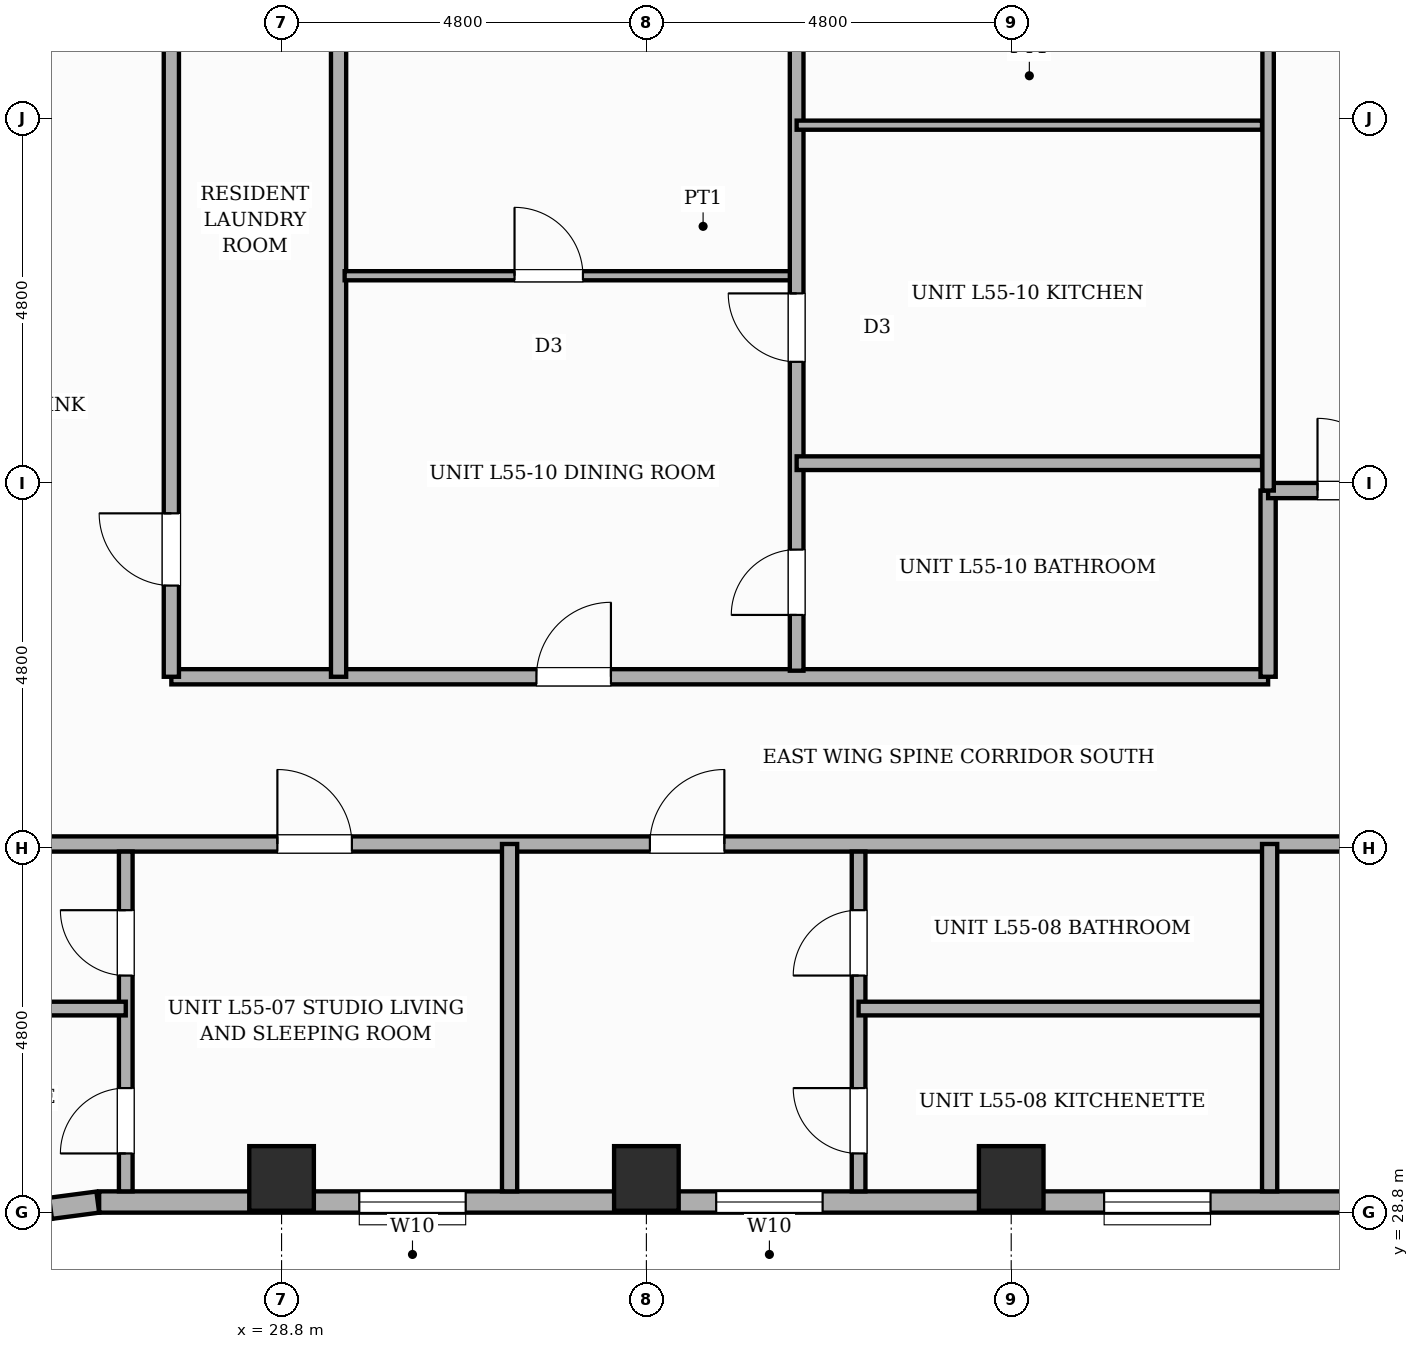
"""IFC4 building model, lengths in metres.
Left out: names, types, materials, properties, quantities, classifications, styles, units other than length and angle.
Written with IfcOpenShell. Run it as: python <this file> out.ifc"""

import sys

from ifc_helpers import new_model, si_unit, direction, frame, frame_2d, origin, origin_2d, place, context, subcontext, project, spatial, rectangle, extrude, element, fill, save


model = new_model("IFC4")
c1 = context("Model", 3, precision=1e-05, world=origin(), true_north=direction((0.0, 1.0)))
c2 = subcontext(c1, "Body", "Model", "MODEL_VIEW")
j1 = project(units=[si_unit("LENGTHUNIT", "METRE"), si_unit("PLANEANGLEUNIT", "RADIAN")], contexts=[c1])
p1 = place(None, origin())
s1 = spatial("IfcSite", under=j1, at=p1, CompositionType="ELEMENT")
p2 = place(p1, origin())
s2 = spatial("IfcBuilding", under=s1, at=p2, CompositionType="ELEMENT")
p3 = place(p2, frame((0.0, 0.0, 211.0)))
s3 = spatial("IfcBuildingStorey", under=s2, at=p3, CompositionType="ELEMENT", Elevation=211.0)
for number, where, z_axis, x_axis in (
    (1, (28.8, 29.25, 0.0), (0.0, 0.0, 1.0), (1.0, 0.0, 0.0)),
    (2, (33.6, 29.25, 0.0), (0.0, 0.0, 1.0), (1.0, 0.0, 0.0)),
    (3, (38.4, 29.25, 0.0), (0.0, 0.0, 1.0), (1.0, 0.0, 0.0)),
):
    element("IfcColumn", number, at=place(p3, frame(where, z_axis=z_axis, x_axis=x_axis)), inside=s3, PredefinedType="COLUMN", context=c2, shape_type="SweptSolid", body=[
        extrude(rectangle(XDim=0.85, YDim=0.85, at=origin_2d()), origin(), (0.0, 0.0, 1.0), 3.6),
    ])
p4 = place(p3, frame((50.4, 28.94, 0.0), z_axis=(0.0, 0.0, 1.0), x_axis=(-1.0, 0.0, 0.0)))
e4 = element("IfcWall", 4, at=p4, inside=s3, PredefinedType="STANDARD", context=c2, shape_type="SweptSolid", body=[
    extrude(rectangle(XDim=24.0, YDim=0.28, at=frame_2d((12.0, 0.0))), origin(), (0.0, 0.0, 1.0), 2.66),
])
p5 = place(p4, frame((19.177, 0.0, 0.65)))
e5 = element("IfcOpeningElement", 5, at=p5, cuts=e4, PredefinedType="OPENING", context=c2, shape_type="SweptSolid", body=[
    extrude(rectangle(XDim=1.4, YDim=1.1, at=frame_2d((0.7, 0.55))), frame((0.0, 0.15, 0.0), z_axis=(0.0, -1.0, 0.0), x_axis=(1.0, 0.0, 0.0)), (0.0, 0.0, 1.0), 0.3),
])
p6 = place(p4, frame((14.481, 0.0, 0.65)))
e6 = element("IfcOpeningElement", 6, at=p6, cuts=e4, PredefinedType="OPENING", context=c2, shape_type="SweptSolid", body=[
    extrude(rectangle(XDim=1.4, YDim=1.1, at=frame_2d((0.7, 0.55))), frame((0.0, 0.15, 0.0), z_axis=(0.0, -1.0, 0.0), x_axis=(1.0, 0.0, 0.0)), (0.0, 0.0, 1.0), 0.3),
])
p7 = place(p4, frame((4.847, 0.0, 0.65)))
e7 = element("IfcOpeningElement", 7, at=p7, cuts=e4, PredefinedType="OPENING", context=c2, shape_type="SweptSolid", body=[
    extrude(rectangle(XDim=1.4, YDim=1.1, at=frame_2d((0.7, 0.55))), frame((0.0, 0.15, 0.0), z_axis=(0.0, -1.0, 0.0), x_axis=(1.0, 0.0, 0.0)), (0.0, 0.0, 1.0), 0.3),
])
p8 = place(p4, frame((9.377, 0.0, 0.65)))
e8 = element("IfcOpeningElement", 8, at=p8, cuts=e4, PredefinedType="OPENING", context=c2, shape_type="SweptSolid", body=[
    extrude(rectangle(XDim=1.4, YDim=1.1, at=frame_2d((0.7, 0.55))), frame((0.0, 0.15, 0.0), z_axis=(0.0, -1.0, 0.0), x_axis=(1.0, 0.0, 0.0)), (0.0, 0.0, 1.0), 0.3),
])
p9 = place(p4, frame((0.308, 0.0, 0.65)))
e9 = element("IfcOpeningElement", 9, at=p9, cuts=e4, PredefinedType="OPENING", context=c2, shape_type="SweptSolid", body=[
    extrude(rectangle(XDim=1.4, YDim=1.1, at=frame_2d((0.7, 0.55))), frame((0.0, 0.15, 0.0), z_axis=(0.0, -1.0, 0.0), x_axis=(1.0, 0.0, 0.0)), (0.0, 0.0, 1.0), 0.3),
])
p10 = place(p3, frame((26.382, 28.939, 0.0), z_axis=(0.0, 0.0, 1.0), x_axis=(-0.9914410257, -0.130555323746, 0.0)))
e10 = element("IfcWall", 10, at=p10, inside=s3, PredefinedType="STANDARD", context=c2, shape_type="SweptSolid", body=[
    extrude(rectangle(XDim=0.626, YDim=0.28, at=frame_2d((0.313, 0.0))), origin(), (0.0, 0.0, 1.0), 3.38),
])
p11 = place(p3, frame((22.75, 33.65, 0.0), z_axis=(0.0, 0.0, 1.0), x_axis=(1.0, 0.0, 0.0)))
e11 = element("IfcWall", 11, at=p11, inside=s3, PredefinedType="PARTITIONING", context=c2, shape_type="SweptSolid", body=[
    extrude(rectangle(XDim=29.77, YDim=0.2, at=frame_2d((14.885, 0.0))), origin(), (0.0, 0.0, 1.0), 3.38),
])
p12 = place(p11, frame((5.995, 0.0, 0.0)))
e12 = element("IfcOpeningElement", 12, at=p12, cuts=e11, PredefinedType="OPENING", context=c2, shape_type="SweptSolid", body=[
    extrude(rectangle(XDim=0.98, YDim=2.18, at=frame_2d((0.49, 1.09))), frame((0.0, 0.11, 0.0), z_axis=(0.0, -1.0, 0.0), x_axis=(1.0, 0.0, 0.0)), (0.0, 0.0, 1.0), 0.22),
])
p13 = place(p11, frame((10.896, 0.0, 0.0)))
e13 = element("IfcOpeningElement", 13, at=p13, cuts=e11, PredefinedType="OPENING", context=c2, shape_type="SweptSolid", body=[
    extrude(rectangle(XDim=0.98, YDim=2.18, at=frame_2d((0.49, 1.09))), frame((0.0, 0.11, 0.0), z_axis=(0.0, -1.0, 0.0), x_axis=(1.0, 0.0, 0.0)), (0.0, 0.0, 1.0), 0.22),
])
p14 = place(p11, frame((20.73, 0.0, 0.0)))
e14 = element("IfcOpeningElement", 14, at=p14, cuts=e11, PredefinedType="OPENING", context=c2, shape_type="SweptSolid", body=[
    extrude(rectangle(XDim=0.98, YDim=2.18, at=frame_2d((0.49, 1.09))), frame((0.0, 0.11, 0.0), z_axis=(0.0, -1.0, 0.0), x_axis=(1.0, 0.0, 0.0)), (0.0, 0.0, 1.0), 0.22),
])
p15 = place(p3, frame((27.35, 35.85, 0.0), z_axis=(0.0, 0.0, 1.0), x_axis=(1.0, 0.0, 0.0)))
e15 = element("IfcWall", 15, at=p15, inside=s3, PredefinedType="PARTITIONING", context=c2, shape_type="SweptSolid", body=[
    extrude(rectangle(XDim=14.43, YDim=0.2, at=frame_2d((7.215, 0.0))), origin(), (0.0, 0.0, 1.0), 3.38),
])
p16 = place(p15, frame((4.803, 0.0, 0.0)))
e16 = element("IfcOpeningElement", 16, at=p16, cuts=e15, PredefinedType="OPENING", context=c2, shape_type="SweptSolid", body=[
    extrude(rectangle(XDim=0.98, YDim=2.18, at=frame_2d((0.49, 1.09))), frame((0.0, 0.11, 0.0), z_axis=(0.0, -1.0, 0.0), x_axis=(1.0, 0.0, 0.0)), (0.0, 0.0, 1.0), 0.22),
])
p17 = place(p3, frame((27.35, 35.85, 0.0), z_axis=(0.0, 0.0, 1.0), x_axis=(0.0, 1.0, 0.0)))
e17 = element("IfcWall", 17, at=p17, inside=s3, PredefinedType="PARTITIONING", context=c2, shape_type="SweptSolid", body=[
    extrude(rectangle(XDim=11.87, YDim=0.2, at=frame_2d((5.935, 0.0))), origin(), (0.0, 0.0, 1.0), 3.38),
])
p18 = place(p17, frame((1.2, 0.0, 0.0)))
e18 = element("IfcOpeningElement", 18, at=p18, cuts=e17, PredefinedType="OPENING", context=c2, shape_type="SweptSolid", body=[
    extrude(rectangle(XDim=0.95, YDim=2.15, at=frame_2d((0.475, 1.075))), frame((0.0, 0.11, 0.0), z_axis=(0.0, -1.0, 0.0), x_axis=(1.0, 0.0, 0.0)), (0.0, 0.0, 1.0), 0.22),
])
p19 = place(p3, frame((41.78, 35.85, 0.0), z_axis=(0.0, 0.0, 1.0), x_axis=(0.0, 1.0, 0.0)))
e19 = element("IfcWall", 19, at=p19, inside=s3, PredefinedType="PARTITIONING", context=c2, shape_type="SweptSolid", body=[
    extrude(rectangle(XDim=2.45, YDim=0.2, at=frame_2d((1.225, 0.0))), origin(), (0.0, 0.0, 1.0), 3.38),
])
p20 = place(p3, frame((41.78, 38.3, 0.0), z_axis=(0.0, 0.0, 1.0), x_axis=(1.0, 0.0, 0.0)))
e20 = element("IfcWall", 20, at=p20, inside=s3, PredefinedType="PARTITIONING", context=c2, shape_type="SweptSolid", body=[
    extrude(rectangle(XDim=2.24, YDim=0.2, at=frame_2d((1.12, 0.0))), origin(), (0.0, 0.0, 1.0), 3.38),
])
p21 = place(p20, frame((0.65, 0.0, 0.0)))
e21 = element("IfcOpeningElement", 21, at=p21, cuts=e20, PredefinedType="OPENING", context=c2, shape_type="SweptSolid", body=[
    extrude(rectangle(XDim=0.95, YDim=2.15, at=frame_2d((0.475, 1.075))), frame((0.0, 0.11, 0.0), z_axis=(0.0, -1.0, 0.0), x_axis=(1.0, 0.0, 0.0)), (0.0, 0.0, 1.0), 0.22),
])
p22 = place(p3, frame((26.75, 29.08, 0.0), z_axis=(0.0, 0.0, 1.0), x_axis=(0.0, 1.0, 0.0)))
e22 = element("IfcWall", 22, at=p22, inside=s3, PredefinedType="PLUMBINGWALL", context=c2, shape_type="SweptSolid", body=[
    extrude(rectangle(XDim=4.47, YDim=0.18, at=frame_2d((2.235, 0.0))), origin(), (0.0, 0.0, 1.0), 3.38),
])
p23 = place(p22, frame((0.499, 0.0, 0.0)))
e23 = element("IfcOpeningElement", 23, at=p23, cuts=e22, PredefinedType="OPENING", context=c2, shape_type="SweptSolid", body=[
    extrude(rectangle(XDim=0.86, YDim=2.1, at=frame_2d((0.43, 1.05))), frame((0.0, 0.1, 0.0), z_axis=(0.0, -1.0, 0.0), x_axis=(1.0, 0.0, 0.0)), (0.0, 0.0, 1.0), 0.2),
])
p24 = place(p22, frame((2.839, 0.0, 0.0)))
e24 = element("IfcOpeningElement", 24, at=p24, cuts=e22, PredefinedType="OPENING", context=c2, shape_type="SweptSolid", body=[
    extrude(rectangle(XDim=0.86, YDim=2.1, at=frame_2d((0.43, 1.05))), frame((0.0, 0.1, 0.0), z_axis=(0.0, -1.0, 0.0), x_axis=(1.0, 0.0, 0.0)), (0.0, 0.0, 1.0), 0.2),
])
p25 = place(p3, frame((22.85, 31.485, 0.0), z_axis=(0.0, 0.0, 1.0), x_axis=(1.0, 0.0, 0.0)))
e25 = element("IfcWall", 25, at=p25, inside=s3, PredefinedType="PLUMBINGWALL", context=c2, shape_type="SweptSolid", body=[
    extrude(rectangle(XDim=3.9, YDim=0.18, at=frame_2d((1.95, 0.0))), origin(), (0.0, 0.0, 1.0), 3.38),
])
p26 = place(p3, frame((31.8, 29.08, 0.0), z_axis=(0.0, 0.0, 1.0), x_axis=(0.0, 1.0, 0.0)))
e26 = element("IfcWall", 26, at=p26, inside=s3, PredefinedType="SOLIDWALL", context=c2, shape_type="SweptSolid", body=[
    extrude(rectangle(XDim=4.57, YDim=0.2, at=frame_2d((2.285, 0.0))), origin(), (0.0, 0.0, 1.0), 3.38),
])
p27 = place(p3, frame((36.392, 29.08, 0.0), z_axis=(0.0, 0.0, 1.0), x_axis=(0.0, 1.0, 0.0)))
e27 = element("IfcWall", 27, at=p27, inside=s3, PredefinedType="PLUMBINGWALL", context=c2, shape_type="SweptSolid", body=[
    extrude(rectangle(XDim=4.47, YDim=0.18, at=frame_2d((2.235, 0.0))), origin(), (0.0, 0.0, 1.0), 3.38),
])
p28 = place(p27, frame((0.499, 0.0, 0.0)))
e28 = element("IfcOpeningElement", 28, at=p28, cuts=e27, PredefinedType="OPENING", context=c2, shape_type="SweptSolid", body=[
    extrude(rectangle(XDim=0.86, YDim=2.1, at=frame_2d((0.43, 1.05))), frame((0.0, 0.1, 0.0), z_axis=(0.0, -1.0, 0.0), x_axis=(1.0, 0.0, 0.0)), (0.0, 0.0, 1.0), 0.2),
])
p29 = place(p27, frame((2.839, 0.0, 0.0)))
e29 = element("IfcOpeningElement", 29, at=p29, cuts=e27, PredefinedType="OPENING", context=c2, shape_type="SweptSolid", body=[
    extrude(rectangle(XDim=0.86, YDim=2.1, at=frame_2d((0.43, 1.05))), frame((0.0, 0.1, 0.0), z_axis=(0.0, -1.0, 0.0), x_axis=(1.0, 0.0, 0.0)), (0.0, 0.0, 1.0), 0.2),
])
p30 = place(p3, frame((36.392, 31.485, 0.0), z_axis=(0.0, 0.0, 1.0), x_axis=(1.0, 0.0, 0.0)))
e30 = element("IfcWall", 30, at=p30, inside=s3, PredefinedType="PLUMBINGWALL", context=c2, shape_type="SweptSolid", body=[
    extrude(rectangle(XDim=5.408, YDim=0.18, at=frame_2d((2.704, 0.0))), origin(), (0.0, 0.0, 1.0), 3.38),
])
p31 = place(p3, frame((41.8, 29.08, 0.0), z_axis=(0.0, 0.0, 1.0), x_axis=(0.0, 1.0, 0.0)))
e31 = element("IfcWall", 31, at=p31, inside=s3, PredefinedType="SOLIDWALL", context=c2, shape_type="SweptSolid", body=[
    extrude(rectangle(XDim=4.57, YDim=0.2, at=frame_2d((2.285, 0.0))), origin(), (0.0, 0.0, 1.0), 3.38),
])
p32 = place(p3, frame((29.55, 35.85, 0.0), z_axis=(0.0, 0.0, 1.0), x_axis=(0.0, 1.0, 0.0)))
e32 = element("IfcWall", 32, at=p32, inside=s3, PredefinedType="SOLIDWALL", context=c2, shape_type="SweptSolid", body=[
    extrude(rectangle(XDim=11.87, YDim=0.2, at=frame_2d((5.935, 0.0))), origin(), (0.0, 0.0, 1.0), 3.38),
])
p33 = place(p3, frame((29.63, 41.126, 0.0), z_axis=(0.0, 0.0, 1.0), x_axis=(1.0, 0.0, 0.0)))
e33 = element("IfcWall", 33, at=p33, inside=s3, PredefinedType="PARTITIONING", context=c2, shape_type="SweptSolid", body=[
    extrude(rectangle(XDim=5.947, YDim=0.12, at=frame_2d((2.974, 0.0))), origin(), (0.0, 0.0, 1.0), 3.38),
])
p34 = place(p33, frame((2.235, 0.0, 0.0)))
e34 = element("IfcOpeningElement", 34, at=p34, cuts=e33, PredefinedType="OPENING", context=c2, shape_type="SweptSolid", body=[
    extrude(rectangle(XDim=0.9, YDim=2.15, at=frame_2d((0.45, 1.075))), frame((0.0, 0.07, 0.0), z_axis=(0.0, -1.0, 0.0), x_axis=(1.0, 0.0, 0.0)), (0.0, 0.0, 1.0), 0.14),
])
p35 = place(p3, frame((35.577, 35.93, 0.0), z_axis=(0.0, 0.0, 1.0), x_axis=(0.0, 1.0, 0.0)))
e35 = element("IfcWall", 35, at=p35, inside=s3, PredefinedType="PLUMBINGWALL", context=c2, shape_type="SweptSolid", body=[
    extrude(rectangle(XDim=11.79, YDim=0.18, at=frame_2d((5.895, 0.0))), origin(), (0.0, 0.0, 1.0), 3.38),
])
p36 = place(p35, frame((0.733, 0.0, 0.0)))
e36 = element("IfcOpeningElement", 36, at=p36, cuts=e35, PredefinedType="OPENING", context=c2, shape_type="SweptSolid", body=[
    extrude(rectangle(XDim=0.86, YDim=2.1, at=frame_2d((0.43, 1.05))), frame((0.0, 0.1, 0.0), z_axis=(0.0, -1.0, 0.0), x_axis=(1.0, 0.0, 0.0)), (0.0, 0.0, 1.0), 0.2),
])
p37 = place(p35, frame((4.064, 0.0, 0.0)))
e37 = element("IfcOpeningElement", 37, at=p37, cuts=e35, PredefinedType="OPENING", context=c2, shape_type="SweptSolid", body=[
    extrude(rectangle(XDim=0.9, YDim=2.15, at=frame_2d((0.45, 1.075))), frame((0.0, 0.1, 0.0), z_axis=(0.0, -1.0, 0.0), x_axis=(1.0, 0.0, 0.0)), (0.0, 0.0, 1.0), 0.2),
])
p38 = place(p35, frame((8.789, 0.0, 0.0)))
e38 = element("IfcOpeningElement", 38, at=p38, cuts=e35, PredefinedType="OPENING", context=c2, shape_type="SweptSolid", body=[
    extrude(rectangle(XDim=0.9, YDim=2.15, at=frame_2d((0.45, 1.075))), frame((0.0, 0.1, 0.0), z_axis=(0.0, -1.0, 0.0), x_axis=(1.0, 0.0, 0.0)), (0.0, 0.0, 1.0), 0.2),
])
p39 = place(p3, frame((35.577, 38.66, 0.0), z_axis=(0.0, 0.0, 1.0), x_axis=(1.0, 0.0, 0.0)))
e39 = element("IfcWall", 39, at=p39, inside=s3, PredefinedType="PLUMBINGWALL", context=c2, shape_type="SweptSolid", body=[
    extrude(rectangle(XDim=6.123, YDim=0.18, at=frame_2d((3.062, 0.0))), origin(), (0.0, 0.0, 1.0), 3.38),
])
p40 = place(p3, frame((35.577, 43.107, 0.0), z_axis=(0.0, 0.0, 1.0), x_axis=(1.0, 0.0, 0.0)))
e40 = element("IfcWall", 40, at=p40, inside=s3, PredefinedType="PARTITIONING", context=c2, shape_type="SweptSolid", body=[
    extrude(rectangle(XDim=6.123, YDim=0.12, at=frame_2d((3.062, 0.0))), origin(), (0.0, 0.0, 1.0), 3.38),
])
p41 = place(p3, frame((41.78, 38.3, 0.0), z_axis=(0.0, 0.0, 1.0), x_axis=(0.0, 1.0, 0.0)))
e41 = element("IfcWall", 41, at=p41, inside=s3, PredefinedType="PARTITIONING", context=c2, shape_type="SweptSolid", body=[
    extrude(rectangle(XDim=9.42, YDim=0.15, at=frame_2d((4.71, 0.0))), origin(), (0.0, 0.0, 1.0), 3.38),
])
p42 = place(p5, origin())
e42 = element("IfcWindow", 42, at=p42, inside=s3, PartitioningType="SINGLE_PANEL", PredefinedType="WINDOW", context=c2, shape_type="SweptSolid", body=[
    extrude(rectangle(XDim=1.4, YDim=1.1, at=frame_2d((0.7, 0.55))), frame((0.0, 0.03, 0.0), z_axis=(0.0, -1.0, 0.0), x_axis=(1.0, 0.0, 0.0)), (0.0, 0.0, 1.0), 0.06),
])
fill(e5, e42)
p43 = place(p6, origin())
e43 = element("IfcWindow", 43, at=p43, inside=s3, PartitioningType="SINGLE_PANEL", PredefinedType="WINDOW", context=c2, shape_type="SweptSolid", body=[
    extrude(rectangle(XDim=1.4, YDim=1.1, at=frame_2d((0.7, 0.55))), frame((0.0, 0.03, 0.0), z_axis=(0.0, -1.0, 0.0), x_axis=(1.0, 0.0, 0.0)), (0.0, 0.0, 1.0), 0.06),
])
fill(e6, e43)
p44 = place(p8, origin())
e44 = element("IfcWindow", 44, at=p44, inside=s3, PartitioningType="SINGLE_PANEL", PredefinedType="WINDOW", context=c2, shape_type="SweptSolid", body=[
    extrude(rectangle(XDim=1.4, YDim=1.1, at=frame_2d((0.7, 0.55))), frame((0.0, 0.03, 0.0), z_axis=(0.0, -1.0, 0.0), x_axis=(1.0, 0.0, 0.0)), (0.0, 0.0, 1.0), 0.06),
])
fill(e8, e44)
p45 = place(p12, origin())
e45 = element("IfcDoor", 45, at=p45, inside=s3, OperationType="SINGLE_SWING_LEFT", PredefinedType="DOOR", context=c2, shape_type="SweptSolid", body=[
    extrude(rectangle(XDim=0.98, YDim=2.18, at=frame_2d((0.49, 1.09))), frame((0.0, 0.025, 0.0), z_axis=(0.0, -1.0, 0.0), x_axis=(1.0, 0.0, 0.0)), (0.0, 0.0, 1.0), 0.05),
])
fill(e12, e45)
p46 = place(p23, origin())
e46 = element("IfcDoor", 46, at=p46, inside=s3, OperationType="SINGLE_SWING_LEFT", PredefinedType="DOOR", context=c2, shape_type="SweptSolid", body=[
    extrude(rectangle(XDim=0.86, YDim=2.1, at=frame_2d((0.43, 1.05))), frame((0.0, 0.025, 0.0), z_axis=(0.0, -1.0, 0.0), x_axis=(1.0, 0.0, 0.0)), (0.0, 0.0, 1.0), 0.05),
])
fill(e23, e46)
p47 = place(p24, origin())
e47 = element("IfcDoor", 47, at=p47, inside=s3, OperationType="SINGLE_SWING_RIGHT", PredefinedType="DOOR", context=c2, shape_type="SweptSolid", body=[
    extrude(rectangle(XDim=0.86, YDim=2.1, at=frame_2d((0.43, 1.05))), frame((0.0, 0.025, 0.0), z_axis=(0.0, -1.0, 0.0), x_axis=(1.0, 0.0, 0.0)), (0.0, 0.0, 1.0), 0.05),
])
fill(e24, e47)
p48 = place(p13, origin())
e48 = element("IfcDoor", 48, at=p48, inside=s3, OperationType="SINGLE_SWING_RIGHT", PredefinedType="DOOR", context=c2, shape_type="SweptSolid", body=[
    extrude(rectangle(XDim=0.98, YDim=2.18, at=frame_2d((0.49, 1.09))), frame((0.0, 0.025, 0.0), z_axis=(0.0, -1.0, 0.0), x_axis=(1.0, 0.0, 0.0)), (0.0, 0.0, 1.0), 0.05),
])
fill(e13, e48)
p49 = place(p28, origin())
e49 = element("IfcDoor", 49, at=p49, inside=s3, OperationType="SINGLE_SWING_RIGHT", PredefinedType="DOOR", context=c2, shape_type="SweptSolid", body=[
    extrude(rectangle(XDim=0.86, YDim=2.1, at=frame_2d((0.43, 1.05))), frame((0.0, 0.025, 0.0), z_axis=(0.0, -1.0, 0.0), x_axis=(1.0, 0.0, 0.0)), (0.0, 0.0, 1.0), 0.05),
])
fill(e28, e49)
p50 = place(p29, origin())
e50 = element("IfcDoor", 50, at=p50, inside=s3, OperationType="SINGLE_SWING_LEFT", PredefinedType="DOOR", context=c2, shape_type="SweptSolid", body=[
    extrude(rectangle(XDim=0.86, YDim=2.1, at=frame_2d((0.43, 1.05))), frame((0.0, 0.025, 0.0), z_axis=(0.0, -1.0, 0.0), x_axis=(1.0, 0.0, 0.0)), (0.0, 0.0, 1.0), 0.05),
])
fill(e29, e50)
p51 = place(p18, origin())
e51 = element("IfcDoor", 51, at=p51, inside=s3, OperationType="SINGLE_SWING_RIGHT", PredefinedType="DOOR", context=c2, shape_type="SweptSolid", body=[
    extrude(rectangle(XDim=0.95, YDim=2.15, at=frame_2d((0.475, 1.075))), frame((0.0, 0.025, 0.0), z_axis=(0.0, -1.0, 0.0), x_axis=(1.0, 0.0, 0.0)), (0.0, 0.0, 1.0), 0.05),
])
fill(e18, e51)
p52 = place(p16, origin())
e52 = element("IfcDoor", 52, at=p52, inside=s3, OperationType="SINGLE_SWING_RIGHT", PredefinedType="DOOR", context=c2, shape_type="SweptSolid", body=[
    extrude(rectangle(XDim=0.98, YDim=2.18, at=frame_2d((0.49, 1.09))), frame((0.0, 0.025, 0.0), z_axis=(0.0, -1.0, 0.0), x_axis=(1.0, 0.0, 0.0)), (0.0, 0.0, 1.0), 0.05),
])
fill(e16, e52)
p53 = place(p34, origin())
e53 = element("IfcDoor", 53, at=p53, inside=s3, OperationType="SINGLE_SWING_LEFT", PredefinedType="DOOR", context=c2, shape_type="SweptSolid", body=[
    extrude(rectangle(XDim=0.9, YDim=2.15, at=frame_2d((0.45, 1.075))), frame((0.0, 0.025, 0.0), z_axis=(0.0, -1.0, 0.0), x_axis=(1.0, 0.0, 0.0)), (0.0, 0.0, 1.0), 0.05),
])
fill(e34, e53)
p54 = place(p36, origin())
e54 = element("IfcDoor", 54, at=p54, inside=s3, OperationType="SINGLE_SWING_LEFT", PredefinedType="DOOR", context=c2, shape_type="SweptSolid", body=[
    extrude(rectangle(XDim=0.86, YDim=2.1, at=frame_2d((0.43, 1.05))), frame((0.0, 0.025, 0.0), z_axis=(0.0, -1.0, 0.0), x_axis=(1.0, 0.0, 0.0)), (0.0, 0.0, 1.0), 0.05),
])
fill(e36, e54)
p55 = place(p37, origin())
e55 = element("IfcDoor", 55, at=p55, inside=s3, OperationType="SINGLE_SWING_RIGHT", PredefinedType="DOOR", context=c2, shape_type="SweptSolid", body=[
    extrude(rectangle(XDim=0.9, YDim=2.15, at=frame_2d((0.45, 1.075))), frame((0.0, 0.025, 0.0), z_axis=(0.0, -1.0, 0.0), x_axis=(1.0, 0.0, 0.0)), (0.0, 0.0, 1.0), 0.05),
])
fill(e37, e55)
p56 = place(p21, origin())
e56 = element("IfcDoor", 56, at=p56, inside=s3, OperationType="SINGLE_SWING_LEFT", PredefinedType="DOOR", context=c2, shape_type="SweptSolid", body=[
    extrude(rectangle(XDim=0.95, YDim=2.15, at=frame_2d((0.475, 1.075))), frame((0.0, 0.025, 0.0), z_axis=(0.0, -1.0, 0.0), x_axis=(1.0, 0.0, 0.0)), (0.0, 0.0, 1.0), 0.05),
])
fill(e21, e56)
save(model, sys.argv[1])
